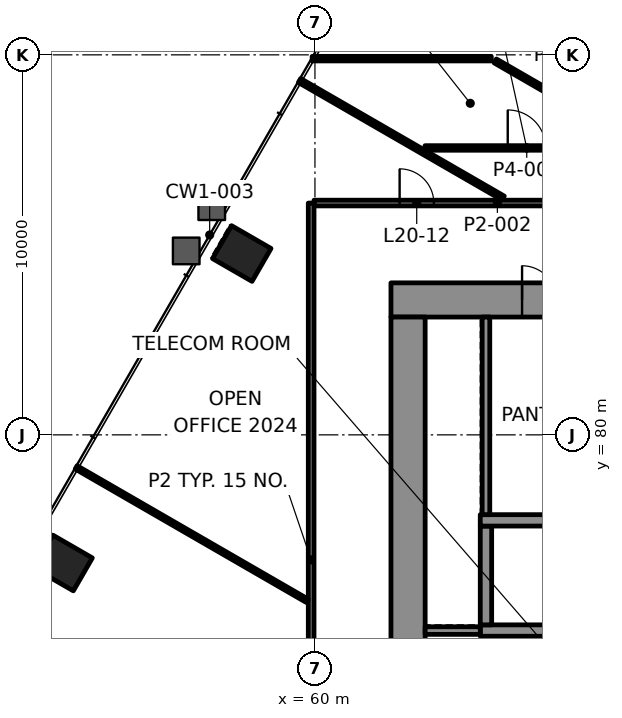
"""IFC4 building model, lengths in metres.
Left out: names, types, materials, properties, quantities, classifications, styles, units other than length and angle.
Written with IfcOpenShell. Run it as: python <this file> out.ifc"""

import sys

from ifc_helpers import new_model, si_unit, direction, frame, frame_2d, origin, origin_2d, place, context, subcontext, project, spatial, rectangle, extrude, element, fill, save


model = new_model("IFC4")
c1 = context("Model", 3, precision=1e-05, world=origin(), true_north=direction((0.0, 1.0)))
c2 = subcontext(c1, "Body", "Model", "MODEL_VIEW")
j1 = project(units=[si_unit("LENGTHUNIT", "METRE"), si_unit("PLANEANGLEUNIT", "RADIAN")], contexts=[c1])
p1 = place(None, origin())
s1 = spatial("IfcSite", under=j1, at=p1, CompositionType="ELEMENT")
p2 = place(p1, origin())
s2 = spatial("IfcBuilding", under=s1, at=p2, CompositionType="ELEMENT")
p3 = place(p2, frame((0.0, 0.0, 90.4)))
s3 = spatial("IfcBuildingStorey", under=s2, at=p3, CompositionType="ELEMENT", Elevation=90.4)
for number, where, z_axis, x_axis in (
    (1, (58.074, 84.772, -0.0), (0.0, 0.0, 1.0), (-0.5, -0.866, 0.0)),
    (2, (53.373, 76.628, -0.0), (0.0, 0.0, 1.0), (-0.5, -0.866, 0.0)),
):
    element("IfcColumn", number, at=place(p3, frame(where, z_axis=z_axis, x_axis=x_axis)), inside=s3, PredefinedType="COLUMN", context=c2, shape_type="SweptSolid", body=[
        extrude(rectangle(XDim=1.0, YDim=1.2, at=origin_2d()), origin(), (0.0, 0.0, 1.0), 4.2),
    ])
p4 = place(p3, frame((62.0, 83.55, 0.0), z_axis=(0.0, 0.0, 1.0), x_axis=(1.0, 0.0, 0.0)))
e3 = element("IfcWall", 3, at=p4, inside=s3, PredefinedType="SHEAR", context=c2, shape_type="SweptSolid", body=[
    extrude(rectangle(XDim=25.1, YDim=0.9, at=frame_2d((12.55, 0.0))), origin(), (0.0, 0.0, 1.0), 4.0),
])
p5 = place(p4, frame((5.695, 0.0, 0.0)))
e4 = element("IfcOpeningElement", 4, at=p5, cuts=e3, PredefinedType="OPENING", context=c2, shape_type="SweptSolid", body=[
    extrude(rectangle(XDim=1.0, YDim=2.1, at=frame_2d((0.5, 1.05))), frame((0.0, 0.46, 0.0), z_axis=(0.0, -1.0, 0.0), x_axis=(1.0, 0.0, 0.0)), (0.0, 0.0, 1.0), 0.92),
])
p6 = place(p4, frame((19.505, 0.0, 0.0)))
e5 = element("IfcOpeningElement", 5, at=p6, cuts=e3, PredefinedType="OPENING", context=c2, shape_type="SweptSolid", body=[
    extrude(rectangle(XDim=1.0, YDim=2.1, at=frame_2d((0.5, 1.05))), frame((0.0, 0.46, 0.0), z_axis=(0.0, -1.0, 0.0), x_axis=(1.0, 0.0, 0.0)), (0.0, 0.0, 1.0), 0.92),
])
p7 = place(p4, frame((3.45, 0.0, 0.0)))
e6 = element("IfcOpeningElement", 6, at=p7, cuts=e3, PredefinedType="OPENING", context=c2, shape_type="SweptSolid", body=[
    extrude(rectangle(XDim=0.9, YDim=2.1, at=frame_2d((0.45, 1.05))), frame((0.0, 0.46, 0.0), z_axis=(0.0, -1.0, 0.0), x_axis=(1.0, 0.0, 0.0)), (0.0, 0.0, 1.0), 0.92),
])
p8 = place(p4, frame((12.65, 0.0, 0.0)))
e7 = element("IfcOpeningElement", 7, at=p8, cuts=e3, PredefinedType="OPENING", context=c2, shape_type="SweptSolid", body=[
    extrude(rectangle(XDim=0.9, YDim=2.1, at=frame_2d((0.45, 1.05))), frame((0.0, 0.46, 0.0), z_axis=(0.0, -1.0, 0.0), x_axis=(1.0, 0.0, 0.0)), (0.0, 0.0, 1.0), 0.92),
])
p9 = place(p4, frame((22.55, 0.0, 0.0)))
e8 = element("IfcOpeningElement", 8, at=p9, cuts=e3, PredefinedType="OPENING", context=c2, shape_type="SweptSolid", body=[
    extrude(rectangle(XDim=0.9, YDim=2.1, at=frame_2d((0.45, 1.05))), frame((0.0, 0.46, 0.0), z_axis=(0.0, -1.0, 0.0), x_axis=(1.0, 0.0, 0.0)), (0.0, 0.0, 1.0), 0.92),
])
p10 = place(p3, frame((62.45, 66.9, 0.0), z_axis=(0.0, 0.0, 1.0), x_axis=(0.0, 1.0, 0.0)))
e9 = element("IfcWall", 9, at=p10, inside=s3, PredefinedType="SHEAR", context=c2, shape_type="SweptSolid", body=[
    extrude(rectangle(XDim=16.2, YDim=0.9, at=frame_2d((8.1, 0.0))), origin(), (0.0, 0.0, 1.0), 4.0),
])
p11 = place(p10, frame((5.5, 0.0, 0.0)))
e10 = element("IfcOpeningElement", 10, at=p11, cuts=e9, PredefinedType="OPENING", context=c2, shape_type="SweptSolid", body=[
    extrude(rectangle(XDim=1.8, YDim=2.1, at=frame_2d((0.9, 1.05))), frame((0.0, 0.46, 0.0), z_axis=(0.0, -1.0, 0.0), x_axis=(1.0, 0.0, 0.0)), (0.0, 0.0, 1.0), 0.92),
])
p12 = place(p3, frame((64.35, 74.85, 0.0), z_axis=(0.0, 0.0, 1.0), x_axis=(1.0, 0.0, 0.0)))
e11 = element("IfcWall", 11, at=p12, inside=s3, PredefinedType="SHEAR", context=c2, shape_type="SweptSolid", body=[
    extrude(rectangle(XDim=3.1, YDim=0.3, at=frame_2d((1.55, 0.0))), origin(), (0.0, 0.0, 1.0), 4.0),
])
p13 = place(p3, frame((64.5, 75.0, 0.0), z_axis=(0.0, 0.0, 1.0), x_axis=(0.0, 1.0, 0.0)))
e12 = element("IfcWall", 12, at=p13, inside=s3, PredefinedType="SHEAR", context=c2, shape_type="SweptSolid", body=[
    extrude(rectangle(XDim=2.6, YDim=0.3, at=frame_2d((1.3, 0.0))), origin(), (0.0, 0.0, 1.0), 4.0),
])
p14 = place(p3, frame((64.35, 77.75, 0.0), z_axis=(0.0, 0.0, 1.0), x_axis=(1.0, 0.0, 0.0)))
e13 = element("IfcWall", 13, at=p14, inside=s3, PredefinedType="SHEAR", context=c2, shape_type="SweptSolid", body=[
    extrude(rectangle(XDim=22.75, YDim=0.3, at=frame_2d((11.375, 0.0))), origin(), (0.0, 0.0, 1.0), 4.0),
])
p15 = place(p14, frame((3.345, 0.0, 0.0)))
e14 = element("IfcOpeningElement", 14, at=p15, cuts=e13, PredefinedType="OPENING", context=c2, shape_type="SweptSolid", body=[
    extrude(rectangle(XDim=1.0, YDim=2.1, at=frame_2d((0.5, 1.05))), frame((0.0, 0.16, 0.0), z_axis=(0.0, -1.0, 0.0), x_axis=(1.0, 0.0, 0.0)), (0.0, 0.0, 1.0), 0.32),
])
p16 = place(p3, frame((59.976, 86.1, 0.0), z_axis=(0.0, 0.0, 1.0), x_axis=(1.0, 0.0, 0.0)))
e15 = element("IfcWall", 15, at=p16, inside=s3, PredefinedType="PARTITIONING", context=c2, shape_type="SweptSolid", body=[
    extrude(rectangle(XDim=9.649, YDim=0.15, at=frame_2d((4.825, 0.0))), origin(), (0.0, 0.0, 1.0), 3.4),
])
p17 = place(p16, frame((2.252, 0.0, 0.0)))
e16 = element("IfcOpeningElement", 16, at=p17, cuts=e15, PredefinedType="OPENING", context=c2, shape_type="SweptSolid", body=[
    extrude(rectangle(XDim=0.9, YDim=2.1, at=frame_2d((0.45, 1.05))), frame((0.0, 0.085, 0.0), z_axis=(0.0, -1.0, 0.0), x_axis=(1.0, 0.0, 0.0)), (0.0, 0.0, 1.0), 0.17),
])
p18 = place(p16, frame((6.723, 0.0, 0.0)))
e17 = element("IfcOpeningElement", 17, at=p18, cuts=e15, PredefinedType="OPENING", context=c2, shape_type="SweptSolid", body=[
    extrude(rectangle(XDim=1.2, YDim=2.1, at=frame_2d((0.6, 1.05))), frame((0.0, 0.085, 0.0), z_axis=(0.0, -1.0, 0.0), x_axis=(1.0, 0.0, 0.0)), (0.0, 0.0, 1.0), 0.17),
])
p19 = place(p3, frame((62.896, 87.55, 0.0), z_axis=(0.0, 0.0, 1.0), x_axis=(1.0, 0.0, 0.0)))
e18 = element("IfcWall", 18, at=p19, inside=s3, PredefinedType="PARTITIONING", context=c2, shape_type="SweptSolid", body=[
    extrude(rectangle(XDim=5.354, YDim=0.12, at=frame_2d((2.677, 0.0))), origin(), (0.0, 0.0, 1.0), 3.4),
])
p20 = place(p19, frame((2.177, 0.0, 0.0)))
e19 = element("IfcOpeningElement", 19, at=p20, cuts=e18, PredefinedType="OPENING", context=c2, shape_type="SweptSolid", body=[
    extrude(rectangle(XDim=1.0, YDim=2.1, at=frame_2d((0.5, 1.05))), frame((0.0, 0.07, 0.0), z_axis=(0.0, -1.0, 0.0), x_axis=(1.0, 0.0, 0.0)), (0.0, 0.0, 1.0), 0.14),
])
p21 = place(p3, frame((59.927, 89.9, 0.0), z_axis=(0.0, 0.0, 1.0), x_axis=(1.0, 0.0, 0.0)))
e20 = element("IfcWall", 20, at=p21, inside=s3, PredefinedType="PARTITIONING", context=c2, shape_type="SweptSolid", body=[
    extrude(rectangle(XDim=4.714, YDim=0.12, at=frame_2d((2.357, 0.0))), origin(), (0.0, 0.0, 1.0), 3.165),
])
p22 = place(p3, frame((59.9, 67.321, 0.0), z_axis=(0.0, 0.0, 1.0), x_axis=(0.0, 1.0, 0.0)))
e21 = element("IfcWall", 21, at=p22, inside=s3, PredefinedType="PARTITIONING", context=c2, shape_type="SweptSolid", body=[
    extrude(rectangle(XDim=18.778, YDim=0.15, at=frame_2d((9.389, 0.0))), origin(), (0.0, 0.0, 1.0), 3.4),
])
p23 = place(p3, frame((68.155, 87.871, 0.0), z_axis=(0.0, 0.0, 1.0), x_axis=(-0.866041060244, 0.499972881236, 0.0)))
e22 = element("IfcWall", 22, at=p23, inside=s3, PredefinedType="PARTITIONING", context=c2, shape_type="SweptSolid", body=[
    extrude(rectangle(XDim=3.938, YDim=0.12, at=frame_2d((1.969, 0.0))), origin(), (0.0, 0.0, 1.0), 3.4),
])
p24 = place(p3, frame((64.953, 86.23, 0.0), z_axis=(0.0, 0.0, 1.0), x_axis=(-0.866029863972, 0.499992274648, 0.0)))
e23 = element("IfcWall", 23, at=p24, inside=s3, PredefinedType="PARTITIONING", context=c2, shape_type="SweptSolid", body=[
    extrude(rectangle(XDim=6.188, YDim=0.12, at=frame_2d((3.094, 0.0))), origin(), (0.0, 0.0, 1.0), 3.165),
])
p25 = place(p3, frame((59.799, 75.632, 0.0), z_axis=(0.0, 0.0, 1.0), x_axis=(-0.866018287837, 0.500012324981, 0.0)))
e24 = element("IfcWall", 24, at=p25, inside=s3, PredefinedType="PARTITIONING", context=c2, shape_type="SweptSolid", body=[
    extrude(rectangle(XDim=7.023, YDim=0.1, at=frame_2d((3.512, 0.0))), origin(), (0.0, 0.0, 1.0), 3.165),
])
p26 = place(p3, frame((62.9, 74.85, 0.0), z_axis=(0.0, 0.0, 1.0), x_axis=(1.0, 0.0, 0.0)))
e25 = element("IfcWall", 25, at=p26, inside=s3, PredefinedType="PARTITIONING", context=c2, shape_type="SweptSolid", body=[
    extrude(rectangle(XDim=1.45, YDim=0.2, at=frame_2d((0.725, 0.0))), origin(), (0.0, 0.0, 1.0), 4.0),
])
p27 = place(p3, frame((64.5, 77.9, 0.0), z_axis=(0.0, 0.0, 1.0), x_axis=(0.0, 1.0, 0.0)))
e26 = element("IfcWall", 26, at=p27, inside=s3, PredefinedType="PARTITIONING", context=c2, shape_type="SweptSolid", body=[
    extrude(rectangle(XDim=5.2, YDim=0.2, at=frame_2d((2.6, 0.0))), origin(), (0.0, 0.0, 1.0), 4.0),
])
p28 = place(p17, origin())
e27 = element("IfcDoor", 27, at=p28, inside=s3, OperationType="SINGLE_SWING_LEFT", PredefinedType="DOOR", context=c2, shape_type="SweptSolid", body=[
    extrude(rectangle(XDim=0.9, YDim=2.1, at=frame_2d((0.45, 1.05))), frame((0.0, 0.025, 0.0), z_axis=(0.0, -1.0, 0.0), x_axis=(1.0, 0.0, 0.0)), (0.0, 0.0, 1.0), 0.05),
])
fill(e16, e27)
p29 = place(p20, origin())
e28 = element("IfcDoor", 28, at=p29, inside=s3, OperationType="SINGLE_SWING_RIGHT", PredefinedType="DOOR", context=c2, shape_type="SweptSolid", body=[
    extrude(rectangle(XDim=1.0, YDim=2.1, at=frame_2d((0.5, 1.05))), frame((0.0, 0.025, 0.0), z_axis=(0.0, -1.0, 0.0), x_axis=(1.0, 0.0, 0.0)), (0.0, 0.0, 1.0), 0.05),
])
fill(e19, e28)
p30 = place(p7, origin())
e29 = element("IfcDoor", 29, at=p30, inside=s3, OperationType="SINGLE_SWING_RIGHT", PredefinedType="DOOR", context=c2, shape_type="SweptSolid", body=[
    extrude(rectangle(XDim=0.9, YDim=2.1, at=frame_2d((0.45, 1.05))), frame((0.0, 0.17, 0.0), z_axis=(0.0, -1.0, 0.0), x_axis=(1.0, 0.0, 0.0)), (0.0, 0.0, 1.0), 0.34),
])
fill(e6, e29)
save(model, sys.argv[1])
